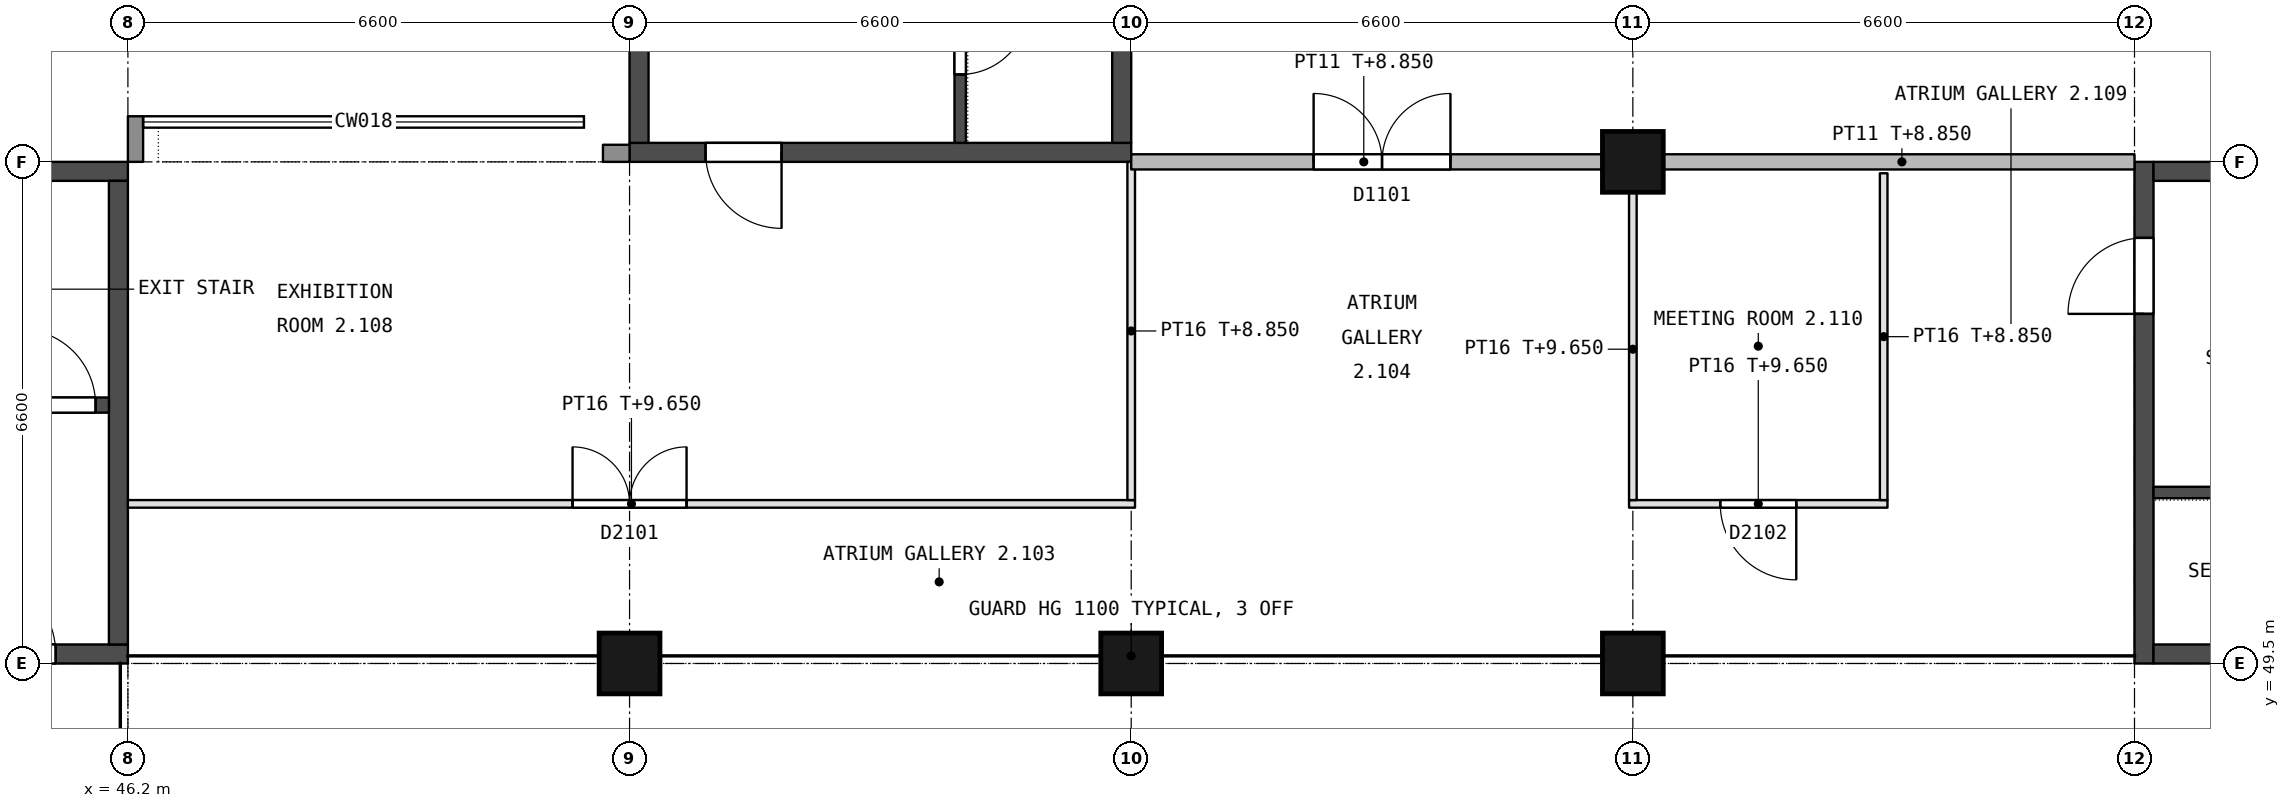
"""IFC4 building model, lengths in metres.
Left out: names, types, materials, properties, quantities, classifications, styles, units other than length and angle.
Written with IfcOpenShell. Run it as: python <this file> out.ifc"""

import sys

from ifc_helpers import new_model, si_unit, direction, frame, frame_2d, origin, origin_2d, place, context, subcontext, project, spatial, rectangle, extrude, element, fill, save


model = new_model("IFC4")
c1 = context("Model", 3, precision=1e-05, world=origin(), true_north=direction((0.0, 1.0)))
c2 = subcontext(c1, "Body", "Model", "MODEL_VIEW")
j1 = project(units=[si_unit("LENGTHUNIT", "METRE"), si_unit("PLANEANGLEUNIT", "RADIAN")], contexts=[c1])
p1 = place(None, origin())
s1 = spatial("IfcSite", under=j1, at=p1, CompositionType="ELEMENT")
p2 = place(p1, origin())
s2 = spatial("IfcBuilding", under=s1, at=p2, CompositionType="ELEMENT")
p3 = place(p2, frame((0.0, 0.0, 5.4)))
s3 = spatial("IfcBuildingStorey", under=s2, at=p3, CompositionType="ELEMENT", Elevation=5.4)
for number, where, z_axis, x_axis in (
    (1, (66.0, 56.1, 0.0), (0.0, 0.0, 1.0), (1.0, 0.0, 0.0)),
    (2, (52.8, 49.5, 0.0), (0.0, 0.0, 1.0), (1.0, 0.0, 0.0)),
    (3, (59.4, 49.5, 0.0), (0.0, 0.0, 1.0), (1.0, 0.0, 0.0)),
    (4, (66.0, 49.5, 0.0), (0.0, 0.0, 1.0), (1.0, 0.0, 0.0)),
):
    element("IfcColumn", number, at=place(p3, frame(where, z_axis=z_axis, x_axis=x_axis)), inside=s3, PredefinedType="COLUMN", context=c2, shape_type="SweptSolid", body=[
        extrude(rectangle(XDim=0.8, YDim=0.8, at=origin_2d()), origin(), (0.0, 0.0, 1.0), 4.5),
    ])
p4 = place(p3, frame((39.6, 49.625, 0.0), z_axis=(0.0, 0.0, 1.0), x_axis=(1.0, 0.0, 0.0)))
e5 = element("IfcWall", 5, at=p4, inside=s3, PredefinedType="SHEAR", context=c2, shape_type="SweptSolid", body=[
    extrude(rectangle(XDim=6.6, YDim=0.25, at=frame_2d((3.3, 0.0))), origin(), (0.0, 0.0, 1.0), 4.25),
])
p5 = place(p4, frame((4.55, 0.0, 0.0)))
e6 = element("IfcOpeningElement", 6, at=p5, cuts=e5, PredefinedType="OPENING", context=c2, shape_type="SweptSolid", body=[
    extrude(rectangle(XDim=1.1, YDim=2.1, at=frame_2d((0.55, 1.05))), frame((0.0, 0.135, 0.0), z_axis=(0.0, -1.0, 0.0), x_axis=(1.0, 0.0, 0.0)), (0.0, 0.0, 1.0), 0.27),
])
p6 = place(p3, frame((39.6, 55.975, 0.0), z_axis=(0.0, 0.0, 1.0), x_axis=(1.0, 0.0, 0.0)))
e7 = element("IfcWall", 7, at=p6, inside=s3, PredefinedType="SHEAR", context=c2, shape_type="SweptSolid", body=[
    extrude(rectangle(XDim=6.6, YDim=0.25, at=frame_2d((3.3, 0.0))), origin(), (0.0, 0.0, 1.0), 4.25),
])
p7 = place(p3, frame((46.075, 49.75, 0.0), z_axis=(0.0, 0.0, 1.0), x_axis=(0.0, 1.0, 0.0)))
e8 = element("IfcWall", 8, at=p7, inside=s3, PredefinedType="SHEAR", context=c2, shape_type="SweptSolid", body=[
    extrude(rectangle(XDim=6.1, YDim=0.25, at=frame_2d((3.05, 0.0))), origin(), (0.0, 0.0, 1.0), 4.25),
])
p8 = place(p3, frame((39.85, 52.9, 0.0), z_axis=(0.0, 0.0, 1.0), x_axis=(1.0, 0.0, 0.0)))
e9 = element("IfcWall", 9, at=p8, inside=s3, PredefinedType="SHEAR", context=c2, shape_type="SweptSolid", body=[
    extrude(rectangle(XDim=6.1, YDim=0.2, at=frame_2d((3.05, 0.0))), origin(), (0.0, 0.0, 1.0), 4.25),
])
p9 = place(p8, frame((4.925, 0.0, 0.0)))
e10 = element("IfcOpeningElement", 10, at=p9, cuts=e9, PredefinedType="OPENING", context=c2, shape_type="SweptSolid", body=[
    extrude(rectangle(XDim=1.0, YDim=2.1, at=frame_2d((0.5, 1.05))), frame((0.0, 0.11, 0.0), z_axis=(0.0, -1.0, 0.0), x_axis=(1.0, 0.0, 0.0)), (0.0, 0.0, 1.0), 0.22),
])
p10 = place(p3, frame((72.725, 56.1, 0.0), z_axis=(0.0, 0.0, 1.0), x_axis=(0.0, -1.0, 0.0)))
e11 = element("IfcWall", 11, at=p10, inside=s3, PredefinedType="SHEAR", context=c2, shape_type="SweptSolid", body=[
    extrude(rectangle(XDim=6.6, YDim=0.25, at=frame_2d((3.3, 0.0))), origin(), (0.0, 0.0, 1.0), 4.25),
])
p11 = place(p10, frame((1.0, 0.0, 0.0)))
e12 = element("IfcOpeningElement", 12, at=p11, cuts=e11, PredefinedType="OPENING", context=c2, shape_type="SweptSolid", body=[
    extrude(rectangle(XDim=1.0, YDim=2.1, at=frame_2d((0.5, 1.05))), frame((0.0, 0.135, 0.0), z_axis=(0.0, -1.0, 0.0), x_axis=(1.0, 0.0, 0.0)), (0.0, 0.0, 1.0), 0.27),
])
for number, where, z_axis, x_axis in (
    (13, (72.85, 55.975, 0.0), (0.0, 0.0, 1.0), (1.0, 0.0, 0.0)),
    (14, (72.85, 49.625, 0.0), (0.0, 0.0, 1.0), (1.0, 0.0, 0.0)),
):
    element("IfcWall", number, at=place(p3, frame(where, z_axis=z_axis, x_axis=x_axis)), inside=s3, PredefinedType="SHEAR", context=c2, shape_type="SweptSolid", body=[
        extrude(rectangle(XDim=6.1, YDim=0.25, at=frame_2d((3.05, 0.0))), origin(), (0.0, 0.0, 1.0), 4.25),
    ])
p12 = place(p3, frame((72.85, 51.75, 0.0), z_axis=(0.0, 0.0, 1.0), x_axis=(1.0, 0.0, 0.0)))
e15 = element("IfcWall", 15, at=p12, inside=s3, PredefinedType="SHEAR", context=c2, shape_type="SweptSolid", body=[
    extrude(rectangle(XDim=3.05, YDim=0.15, at=frame_2d((1.525, 0.0))), origin(), (0.0, 0.0, 1.0), 4.25),
])
p13 = place(p12, frame((0.9, 0.0, 0.0)))
e16 = element("IfcOpeningElement", 16, at=p13, cuts=e15, PredefinedType="OPENING", context=c2, shape_type="SweptSolid", body=[
    extrude(rectangle(XDim=0.9, YDim=2.1, at=frame_2d((0.45, 1.05))), frame((0.0, 0.085, 0.0), z_axis=(0.0, -1.0, 0.0), x_axis=(1.0, 0.0, 0.0)), (0.0, 0.0, 1.0), 0.17),
])
p14 = place(p3, frame((52.8, 56.225, 0.0), z_axis=(0.0, 0.0, 1.0), x_axis=(1.0, 0.0, 0.0)))
e17 = element("IfcWall", 17, at=p14, inside=s3, PredefinedType="SHEAR", context=c2, shape_type="SweptSolid", body=[
    extrude(rectangle(XDim=6.6, YDim=0.25, at=frame_2d((3.3, 0.0))), origin(), (0.0, 0.0, 1.0), 4.25),
])
p15 = place(p14, frame((1.0, 0.0, 0.0)))
e18 = element("IfcOpeningElement", 18, at=p15, cuts=e17, PredefinedType="OPENING", context=c2, shape_type="SweptSolid", body=[
    extrude(rectangle(XDim=1.0, YDim=2.1, at=frame_2d((0.5, 1.05))), frame((0.0, 0.135, 0.0), z_axis=(0.0, -1.0, 0.0), x_axis=(1.0, 0.0, 0.0)), (0.0, 0.0, 1.0), 0.27),
])
p16 = place(p3, frame((52.925, 56.35, 0.0), z_axis=(0.0, 0.0, 1.0), x_axis=(0.0, 1.0, 0.0)))
e19 = element("IfcWall", 19, at=p16, inside=s3, PredefinedType="SHEAR", context=c2, shape_type="SweptSolid", body=[
    extrude(rectangle(XDim=6.1, YDim=0.25, at=frame_2d((3.05, 0.0))), origin(), (0.0, 0.0, 1.0), 4.25),
])
p17 = place(p16, frame((3.95, 0.0, 0.7)))
e20 = element("IfcOpeningElement", 20, at=p17, cuts=e19, PredefinedType="OPENING", context=c2, shape_type="SweptSolid", body=[
    extrude(rectangle(XDim=1.1, YDim=1.5, at=frame_2d((0.55, 0.75))), frame((0.0, 0.135, 0.0), z_axis=(0.0, -1.0, 0.0), x_axis=(1.0, 0.0, 0.0)), (0.0, 0.0, 1.0), 0.27),
])
p18 = place(p3, frame((59.275, 56.35, 0.0), z_axis=(0.0, 0.0, 1.0), x_axis=(0.0, 1.0, 0.0)))
e21 = element("IfcWall", 21, at=p18, inside=s3, PredefinedType="SHEAR", context=c2, shape_type="SweptSolid", body=[
    extrude(rectangle(XDim=6.1, YDim=0.25, at=frame_2d((3.05, 0.0))), origin(), (0.0, 0.0, 1.0), 4.25),
])
p19 = place(p3, frame((57.15, 56.35, 0.0), z_axis=(0.0, 0.0, 1.0), x_axis=(0.0, 1.0, 0.0)))
e22 = element("IfcWall", 22, at=p19, inside=s3, PredefinedType="SHEAR", context=c2, shape_type="SweptSolid", body=[
    extrude(rectangle(XDim=3.05, YDim=0.15, at=frame_2d((1.525, 0.0))), origin(), (0.0, 0.0, 1.0), 4.25),
])
p20 = place(p19, frame((0.9, 0.0, 0.0)))
e23 = element("IfcOpeningElement", 23, at=p20, cuts=e22, PredefinedType="OPENING", context=c2, shape_type="SweptSolid", body=[
    extrude(rectangle(XDim=0.9, YDim=2.1, at=frame_2d((0.45, 1.05))), frame((0.0, 0.085, 0.0), z_axis=(0.0, -1.0, 0.0), x_axis=(1.0, 0.0, 0.0)), (0.0, 0.0, 1.0), 0.17),
])
p21 = place(p3, frame((52.625, 56.1, 0.0), z_axis=(0.0, 0.0, 1.0), x_axis=(0.0, 1.0, 0.0)))
e24 = element("IfcWall", 24, at=p21, inside=s3, PredefinedType="STANDARD", context=c2, shape_type="SweptSolid", body=[
    extrude(rectangle(XDim=0.225, YDim=0.35, at=frame_2d((0.112, 0.0))), origin(), (0.0, 0.0, 1.0), 3.45),
])
p22 = place(p3, frame((46.3, 56.1, 0.0), z_axis=(0.0, 0.0, 1.0), x_axis=(0.0, 1.0, 0.0)))
e25 = element("IfcWall", 25, at=p22, inside=s3, PredefinedType="STANDARD", context=c2, shape_type="SweptSolid", body=[
    extrude(rectangle(XDim=0.6, YDim=0.2, at=frame_2d((0.3, 0.0))), origin(), (0.0, 0.0, 1.0), 3.45),
])
p23 = place(p3, frame((46.2, 51.6, 0.0), z_axis=(0.0, 0.0, 1.0), x_axis=(1.0, 0.0, 0.0)))
e26 = element("IfcWall", 26, at=p23, inside=s3, PredefinedType="PARTITIONING", context=c2, shape_type="SweptSolid", body=[
    extrude(rectangle(XDim=13.25, YDim=0.1, at=frame_2d((6.625, 0.0))), origin(), (0.0, 0.0, 1.0), 4.25),
])
p24 = place(p23, frame((5.85, 0.0, 0.0)))
e27 = element("IfcOpeningElement", 27, at=p24, cuts=e26, PredefinedType="OPENING", context=c2, shape_type="SweptSolid", body=[
    extrude(rectangle(XDim=1.5, YDim=2.1, at=frame_2d((0.75, 1.05))), frame((0.0, 0.06, 0.0), z_axis=(0.0, -1.0, 0.0), x_axis=(1.0, 0.0, 0.0)), (0.0, 0.0, 1.0), 0.12),
])
p25 = place(p3, frame((65.95, 51.6, 0.0), z_axis=(0.0, 0.0, 1.0), x_axis=(1.0, 0.0, 0.0)))
e28 = element("IfcWall", 28, at=p25, inside=s3, PredefinedType="PARTITIONING", context=c2, shape_type="SweptSolid", body=[
    extrude(rectangle(XDim=3.4, YDim=0.1, at=frame_2d((1.7, 0.0))), origin(), (0.0, 0.0, 1.0), 4.25),
])
p26 = place(p25, frame((1.2, 0.0, 0.0)))
e29 = element("IfcOpeningElement", 29, at=p26, cuts=e28, PredefinedType="OPENING", context=c2, shape_type="SweptSolid", body=[
    extrude(rectangle(XDim=1.0, YDim=2.1, at=frame_2d((0.5, 1.05))), frame((0.0, 0.06, 0.0), z_axis=(0.0, -1.0, 0.0), x_axis=(1.0, 0.0, 0.0)), (0.0, 0.0, 1.0), 0.12),
])
p27 = place(p3, frame((59.4, 51.65, 0.0), z_axis=(0.0, 0.0, 1.0), x_axis=(0.0, 1.0, 0.0)))
e30 = element("IfcWall", 30, at=p27, inside=s3, PredefinedType="PARTITIONING", context=c2, shape_type="SweptSolid", body=[
    extrude(rectangle(XDim=4.45, YDim=0.1, at=frame_2d((2.225, 0.0))), origin(), (0.0, 0.0, 1.0), 3.45),
])
p28 = place(p3, frame((66.0, 51.65, 0.0), z_axis=(0.0, 0.0, 1.0), x_axis=(0.0, 1.0, 0.0)))
e31 = element("IfcWall", 31, at=p28, inside=s3, PredefinedType="PARTITIONING", context=c2, shape_type="SweptSolid", body=[
    extrude(rectangle(XDim=4.05, YDim=0.1, at=frame_2d((2.025, 0.0))), origin(), (0.0, 0.0, 1.0), 4.25),
])
p29 = place(p3, frame((69.3, 51.65, 0.0), z_axis=(0.0, 0.0, 1.0), x_axis=(0.0, 1.0, 0.0)))
e32 = element("IfcWall", 32, at=p29, inside=s3, PredefinedType="PARTITIONING", context=c2, shape_type="SweptSolid", body=[
    extrude(rectangle(XDim=4.3, YDim=0.1, at=frame_2d((2.15, 0.0))), origin(), (0.0, 0.0, 1.0), 3.45),
])
p30 = place(p3, frame((59.4, 56.1, 0.0), z_axis=(0.0, 0.0, 1.0), x_axis=(1.0, 0.0, 0.0)))
e33 = element("IfcWall", 33, at=p30, inside=s3, PredefinedType="PARTITIONING", context=c2, shape_type="SweptSolid", body=[
    extrude(rectangle(XDim=6.2, YDim=0.2, at=frame_2d((3.1, 0.0))), origin(), (0.0, 0.0, 1.0), 3.45),
])
p31 = place(p30, frame((2.4, 0.0, 0.0)))
e34 = element("IfcOpeningElement", 34, at=p31, cuts=e33, PredefinedType="OPENING", context=c2, shape_type="SweptSolid", body=[
    extrude(rectangle(XDim=1.8, YDim=2.1, at=frame_2d((0.9, 1.05))), frame((0.0, 0.11, 0.0), z_axis=(0.0, -1.0, 0.0), x_axis=(1.0, 0.0, 0.0)), (0.0, 0.0, 1.0), 0.22),
])
p32 = place(p3, frame((66.4, 56.1, 0.0), z_axis=(0.0, 0.0, 1.0), x_axis=(1.0, 0.0, 0.0)))
e35 = element("IfcWall", 35, at=p32, inside=s3, PredefinedType="PARTITIONING", context=c2, shape_type="SweptSolid", body=[
    extrude(rectangle(XDim=6.2, YDim=0.2, at=frame_2d((3.1, 0.0))), origin(), (0.0, 0.0, 1.0), 3.45),
])
p33 = place(p5, origin())
e36 = element("IfcDoor", 36, at=p33, inside=s3, OperationType="SINGLE_SWING_LEFT", PredefinedType="DOOR", context=c2, shape_type="SweptSolid", body=[
    extrude(rectangle(XDim=1.1, YDim=2.1, at=frame_2d((0.55, 1.05))), frame((0.0, 0.025, 0.0), z_axis=(0.0, -1.0, 0.0), x_axis=(1.0, 0.0, 0.0)), (0.0, 0.0, 1.0), 0.05),
])
fill(e6, e36)
p34 = place(p9, origin())
e37 = element("IfcDoor", 37, at=p34, inside=s3, OperationType="SINGLE_SWING_LEFT", PredefinedType="DOOR", context=c2, shape_type="SweptSolid", body=[
    extrude(rectangle(XDim=1.0, YDim=2.1, at=frame_2d((0.5, 1.05))), frame((0.0, 0.025, 0.0), z_axis=(0.0, -1.0, 0.0), x_axis=(1.0, 0.0, 0.0)), (0.0, 0.0, 1.0), 0.05),
])
fill(e10, e37)
p35 = place(p11, origin())
e38 = element("IfcDoor", 38, at=p35, inside=s3, OperationType="SINGLE_SWING_RIGHT", PredefinedType="DOOR", context=c2, shape_type="SweptSolid", body=[
    extrude(rectangle(XDim=1.0, YDim=2.1, at=frame_2d((0.5, 1.05))), frame((0.0, 0.025, 0.0), z_axis=(0.0, -1.0, 0.0), x_axis=(1.0, 0.0, 0.0)), (0.0, 0.0, 1.0), 0.05),
])
fill(e12, e38)
p36 = place(p20, origin())
e39 = element("IfcDoor", 39, at=p36, inside=s3, OperationType="SINGLE_SWING_RIGHT", PredefinedType="DOOR", context=c2, shape_type="SweptSolid", body=[
    extrude(rectangle(XDim=0.9, YDim=2.1, at=frame_2d((0.45, 1.05))), frame((0.0, 0.025, 0.0), z_axis=(0.0, -1.0, 0.0), x_axis=(1.0, 0.0, 0.0)), (0.0, 0.0, 1.0), 0.05),
])
fill(e23, e39)
p37 = place(p15, origin())
e40 = element("IfcDoor", 40, at=p37, inside=s3, OperationType="SINGLE_SWING_RIGHT", PredefinedType="DOOR", context=c2, shape_type="SweptSolid", body=[
    extrude(rectangle(XDim=1.0, YDim=2.1, at=frame_2d((0.5, 1.05))), frame((0.0, 0.025, 0.0), z_axis=(0.0, -1.0, 0.0), x_axis=(1.0, 0.0, 0.0)), (0.0, 0.0, 1.0), 0.05),
])
fill(e18, e40)
p38 = place(p24, origin())
e41 = element("IfcDoor", 41, at=p38, inside=s3, OperationType="DOUBLE_DOOR_SINGLE_SWING", PredefinedType="DOOR", context=c2, shape_type="SweptSolid", body=[
    extrude(rectangle(XDim=1.5, YDim=2.1, at=frame_2d((0.75, 1.05))), frame((0.0, 0.025, 0.0), z_axis=(0.0, -1.0, 0.0), x_axis=(1.0, 0.0, 0.0)), (0.0, 0.0, 1.0), 0.05),
])
fill(e27, e41)
p39 = place(p26, origin())
e42 = element("IfcDoor", 42, at=p39, inside=s3, OperationType="SINGLE_SWING_RIGHT", PredefinedType="DOOR", context=c2, shape_type="SweptSolid", body=[
    extrude(rectangle(XDim=1.0, YDim=2.1, at=frame_2d((0.5, 1.05))), frame((0.0, 0.025, 0.0), z_axis=(0.0, -1.0, 0.0), x_axis=(1.0, 0.0, 0.0)), (0.0, 0.0, 1.0), 0.05),
])
fill(e29, e42)
p40 = place(p31, origin())
e43 = element("IfcDoor", 43, at=p40, inside=s3, OperationType="DOUBLE_DOOR_SINGLE_SWING", PredefinedType="DOOR", context=c2, shape_type="SweptSolid", body=[
    extrude(rectangle(XDim=1.8, YDim=2.1, at=frame_2d((0.9, 1.05))), frame((0.0, 0.025, 0.0), z_axis=(0.0, -1.0, 0.0), x_axis=(1.0, 0.0, 0.0)), (0.0, 0.0, 1.0), 0.05),
])
fill(e34, e43)
save(model, sys.argv[1])
